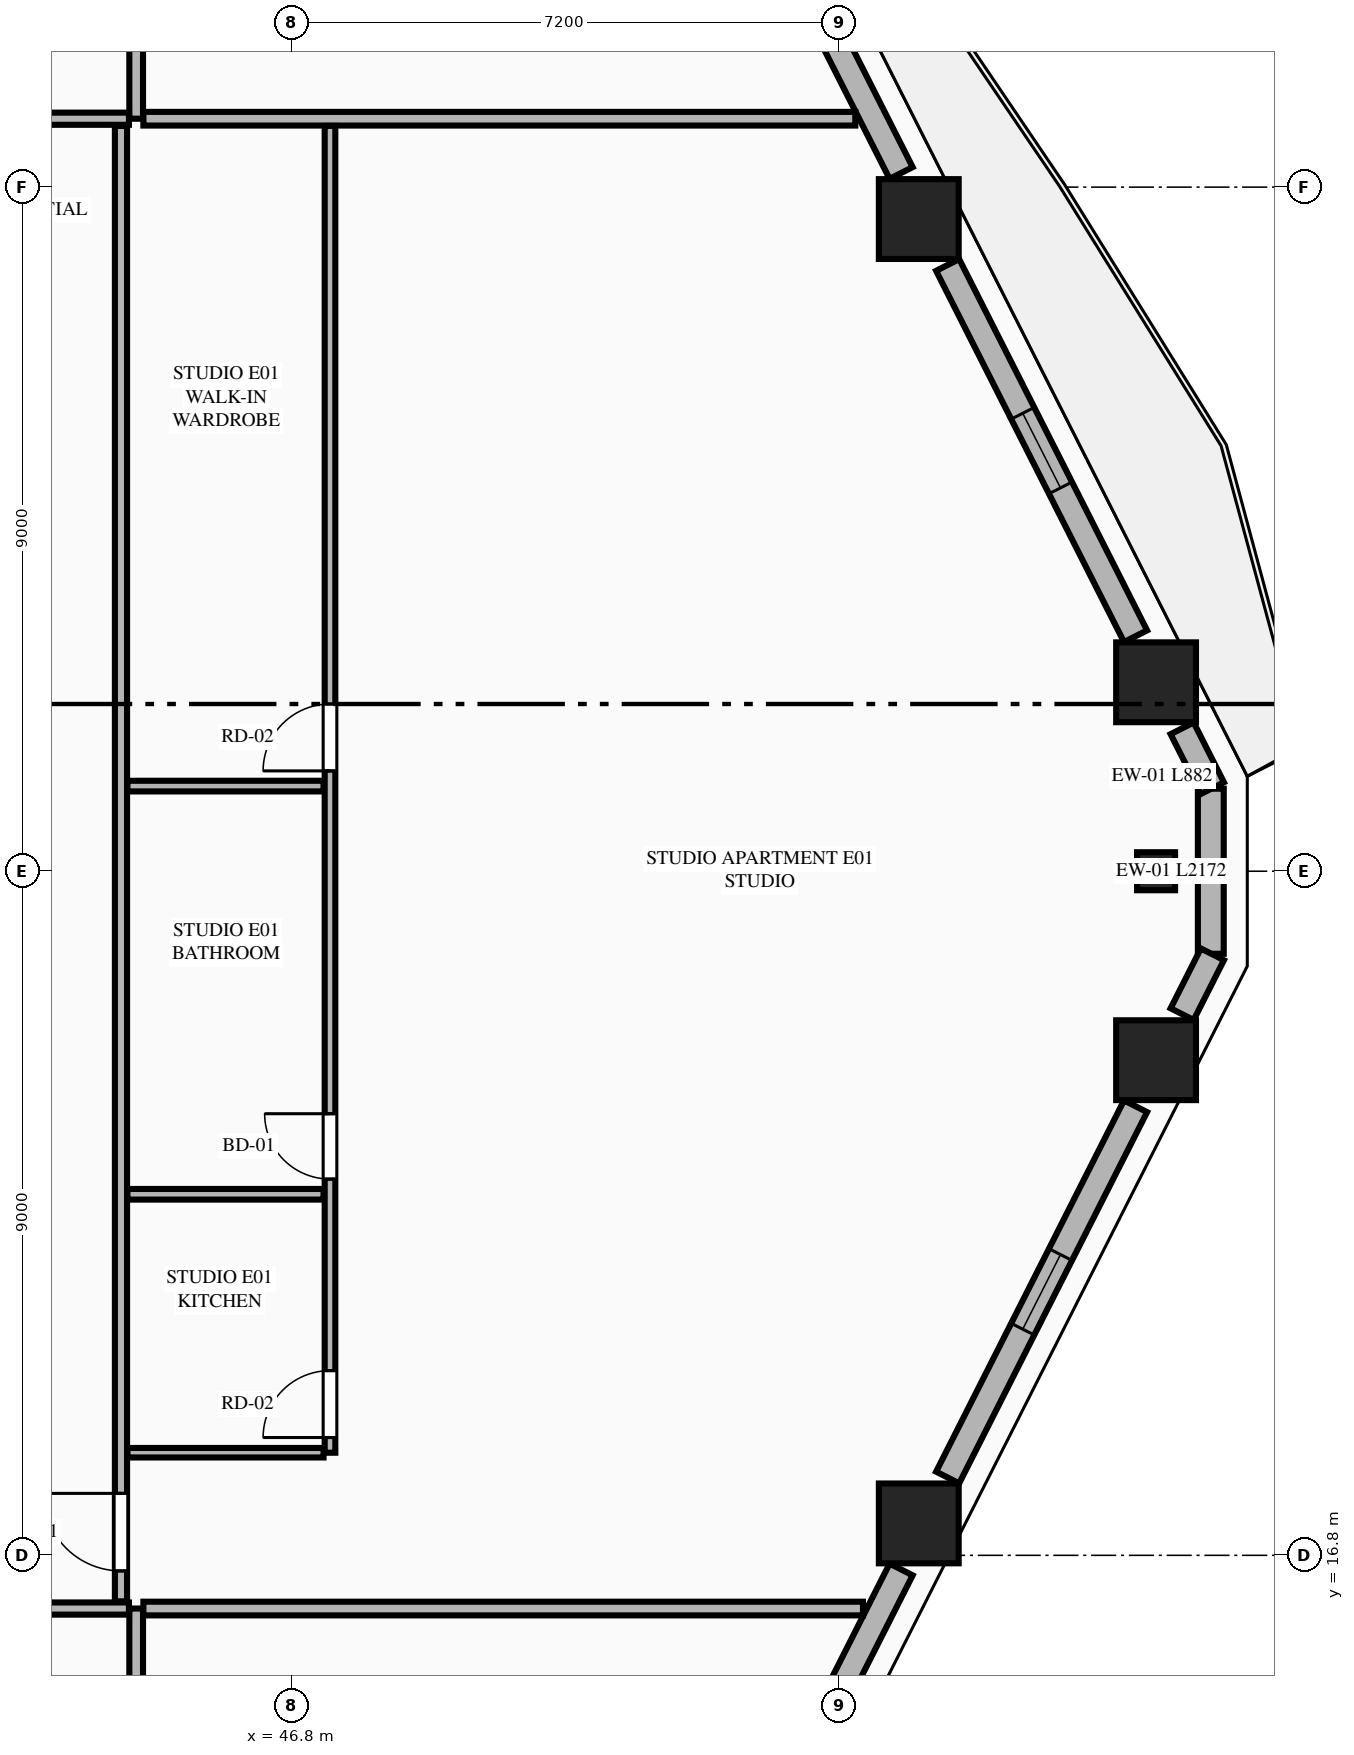
"""IFC4 building model, lengths in metres.
Left out: names, types, materials, properties, quantities, classifications, styles, units other than length and angle.
Written with IfcOpenShell. Run it as: python <this file> out.ifc"""

import sys

from ifc_helpers import new_model, si_unit, direction, frame, frame_2d, origin, origin_2d, place, context, subcontext, project, spatial, rectangle, extrude, element, fill, save


model = new_model("IFC4")
c1 = context("Model", 3, precision=1e-05, world=origin(), true_north=direction((0.0, 1.0)))
c2 = subcontext(c1, "Body", "Model", "MODEL_VIEW")
j1 = project(units=[si_unit("LENGTHUNIT", "METRE"), si_unit("PLANEANGLEUNIT", "RADIAN")], contexts=[c1])
p1 = place(None, origin())
s1 = spatial("IfcSite", under=j1, at=p1, CompositionType="ELEMENT")
p2 = place(p1, origin())
s2 = spatial("IfcBuilding", under=s1, at=p2, CompositionType="ELEMENT")
p3 = place(p2, frame((0.0, 0.0, 90.65)))
s3 = spatial("IfcBuildingStorey", under=s2, at=p3, CompositionType="ELEMENT", Elevation=90.65)
for number, where, z_axis, x_axis in (
    (1, (55.046, 17.22, 0.0), (0.0, 0.0, 1.0), (1.0, 0.0, 0.0)),
    (2, (58.168, 23.314, 0.0), (0.0, 0.0, 1.0), (1.0, 0.0, 0.0)),
    (3, (58.168, 28.286, 0.0), (0.0, 0.0, 1.0), (1.0, 0.0, 0.0)),
    (4, (55.046, 34.38, 0.0), (0.0, 0.0, 1.0), (1.0, 0.0, 0.0)),
):
    element("IfcColumn", number, at=place(p3, frame(where, z_axis=z_axis, x_axis=x_axis)), inside=s3, PredefinedType="COLUMN", context=c2, shape_type="SweptSolid", body=[
        extrude(rectangle(XDim=1.05, YDim=1.05, at=origin_2d()), origin(), (0.0, 0.0, 1.0), 3.55),
    ])
p4 = place(p3, frame((58.168, 25.8, 0.0), z_axis=(0.0, 0.0, 1.0), x_axis=(0.0, 1.0, 0.0)))
e5 = element("IfcColumn", 5, at=p4, inside=s3, PredefinedType="PILASTER", context=c2, shape_type="SweptSolid", body=[
    extrude(rectangle(XDim=0.5, YDim=0.35, at=origin_2d()), origin(), (0.0, 0.0, 1.0), 3.55),
])
p5 = place(p3, frame((58.888, 24.714, 0.0), z_axis=(0.0, 0.0, 1.0), x_axis=(0.0, 1.0, 0.0)))
e6 = element("IfcWall", 6, at=p5, inside=s3, PredefinedType="STANDARD", context=c2, shape_type="SweptSolid", body=[
    extrude(rectangle(XDim=2.172, YDim=0.34, at=frame_2d((1.086, 0.0))), origin(), (0.0, 0.0, 1.0), 3.33),
])
p6 = place(p3, frame((52.233, 11.515, 0.0), z_axis=(0.0, 0.0, 1.0), x_axis=(0.451616680182, 0.892212067942, 0.0)))
e7 = element("IfcWall", 7, at=p6, inside=s3, PredefinedType="STANDARD", context=c2, shape_type="SweptSolid", body=[
    extrude(rectangle(XDim=5.715, YDim=0.34, at=frame_2d((2.857, 0.0))), origin(), (0.0, 0.0, 1.0), 2.712),
])
p7 = place(p6, frame((2.308, 0.0, 0.75)))
e8 = element("IfcOpeningElement", 8, at=p7, cuts=e7, PredefinedType="OPENING", context=c2, shape_type="SweptSolid", body=[
    extrude(rectangle(XDim=1.1, YDim=1.812, at=frame_2d((0.55, 0.906))), frame((0.0, 0.18, 0.0), z_axis=(0.0, -1.0, 0.0), x_axis=(1.0, 0.0, 0.0)), (0.0, 0.0, 1.0), 0.36),
])
p8 = place(p3, frame((55.426, 17.824, 0.0), z_axis=(0.0, 0.0, 1.0), x_axis=(0.451579095309, 0.892231091523, 0.0)))
e9 = element("IfcWall", 9, at=p8, inside=s3, PredefinedType="STANDARD", context=c2, shape_type="SweptSolid", body=[
    extrude(rectangle(XDim=5.474, YDim=0.34, at=frame_2d((2.737, 0.0))), origin(), (0.0, 0.0, 1.0), 2.712),
])
p9 = place(p8, frame((2.187, 0.0, 0.75)))
e10 = element("IfcOpeningElement", 10, at=p9, cuts=e9, PredefinedType="OPENING", context=c2, shape_type="SweptSolid", body=[
    extrude(rectangle(XDim=1.1, YDim=1.812, at=frame_2d((0.55, 0.906))), frame((0.0, 0.18, 0.0), z_axis=(0.0, -1.0, 0.0), x_axis=(1.0, 0.0, 0.0)), (0.0, 0.0, 1.0), 0.36),
])
p10 = place(p3, frame((58.511, 23.92, 0.0), z_axis=(0.0, 0.0, 1.0), x_axis=(0.451195173259, 0.892425299747, 0.0)))
e11 = element("IfcWall", 11, at=p10, inside=s3, PredefinedType="STANDARD", context=c2, shape_type="SweptSolid", body=[
    extrude(rectangle(XDim=0.882, YDim=0.34, at=frame_2d((0.441, 0.0))), origin(), (0.0, 0.0, 1.0), 3.33),
])
p11 = place(p3, frame((58.909, 26.893, 0.0), z_axis=(0.0, 0.0, 1.0), x_axis=(-0.451306655769, 0.892368927327, 0.0)))
e12 = element("IfcWall", 12, at=p11, inside=s3, PredefinedType="STANDARD", context=c2, shape_type="SweptSolid", body=[
    extrude(rectangle(XDim=0.882, YDim=0.34, at=frame_2d((0.441, 0.0))), origin(), (0.0, 0.0, 1.0), 3.33),
])
p12 = place(p3, frame((57.898, 28.892, 0.0), z_axis=(0.0, 0.0, 1.0), x_axis=(-0.451597066012, 0.892221995901, 0.0)))
e13 = element("IfcWall", 13, at=p12, inside=s3, PredefinedType="STANDARD", context=c2, shape_type="SweptSolid", body=[
    extrude(rectangle(XDim=5.474, YDim=0.34, at=frame_2d((2.737, 0.0))), origin(), (0.0, 0.0, 1.0), 2.712),
])
p13 = place(p12, frame((2.187, 0.0, 0.75)))
e14 = element("IfcOpeningElement", 14, at=p13, cuts=e13, PredefinedType="OPENING", context=c2, shape_type="SweptSolid", body=[
    extrude(rectangle(XDim=1.1, YDim=1.812, at=frame_2d((0.55, 0.906))), frame((0.0, 0.18, 0.0), z_axis=(0.0, -1.0, 0.0), x_axis=(1.0, 0.0, 0.0)), (0.0, 0.0, 1.0), 0.36),
])
p14 = place(p3, frame((54.814, 34.986, 0.0), z_axis=(0.0, 0.0, 1.0), x_axis=(-0.451633893529, 0.892203354744, 0.0)))
e15 = element("IfcWall", 15, at=p14, inside=s3, PredefinedType="STANDARD", context=c2, shape_type="SweptSolid", body=[
    extrude(rectangle(XDim=5.715, YDim=0.34, at=frame_2d((2.857, 0.0))), origin(), (0.0, 0.0, 1.0), 2.712),
])
p15 = place(p14, frame((2.833, 0.0, 0.0)))
e16 = element("IfcOpeningElement", 16, at=p15, cuts=e15, PredefinedType="OPENING", context=c2, shape_type="SweptSolid", body=[
    extrude(rectangle(XDim=1.1, YDim=2.25, at=frame_2d((0.55, 1.125))), frame((0.0, 0.18, 0.0), z_axis=(0.0, -1.0, 0.0), x_axis=(1.0, 0.0, 0.0)), (0.0, 0.0, 1.0), 0.36),
])
p16 = place(p3, frame((44.75, 2.455, 0.0), z_axis=(0.0, 0.0, 1.0), x_axis=(0.0, 1.0, 0.0)))
e17 = element("IfcWall", 17, at=p16, inside=s3, PredefinedType="PARTITIONING", context=c2, shape_type="SweptSolid", body=[
    extrude(rectangle(XDim=13.645, YDim=0.18, at=frame_2d((6.823, 0.0))), origin(), (0.0, 0.0, 1.0), 3.33),
])
p17 = place(p3, frame((36.617, 16.1, 0.0), z_axis=(0.0, 0.0, 1.0), x_axis=(1.0, 0.0, 0.0)))
e18 = element("IfcWall", 18, at=p17, inside=s3, PredefinedType="PARTITIONING", context=c2, shape_type="SweptSolid", body=[
    extrude(rectangle(XDim=8.038, YDim=0.16, at=frame_2d((4.019, 0.0))), origin(), (0.0, 0.0, 1.0), 3.33),
])
p18 = place(p17, frame((0.355, 0.0, 0.0)))
e19 = element("IfcOpeningElement", 19, at=p18, cuts=e18, PredefinedType="OPENING", context=c2, shape_type="SweptSolid", body=[
    extrude(rectangle(XDim=1.02, YDim=2.25, at=frame_2d((0.51, 1.125))), frame((0.0, 0.09, 0.0), z_axis=(0.0, -1.0, 0.0), x_axis=(1.0, 0.0, 0.0)), (0.0, 0.0, 1.0), 0.18),
])
p19 = place(p3, frame((44.75, 35.7, 0.0), z_axis=(0.0, 0.0, 1.0), x_axis=(0.0, 1.0, 0.0)))
e20 = element("IfcWall", 20, at=p19, inside=s3, PredefinedType="PARTITIONING", context=c2, shape_type="SweptSolid", body=[
    extrude(rectangle(XDim=13.445, YDim=0.18, at=frame_2d((6.723, 0.0))), origin(), (0.0, 0.0, 1.0), 3.33),
])
p20 = place(p3, frame((20.145, 35.7, 0.0), z_axis=(0.0, 0.0, 1.0), x_axis=(1.0, 0.0, 0.0)))
e21 = element("IfcWall", 21, at=p20, inside=s3, PredefinedType="PARTITIONING", context=c2, shape_type="SweptSolid", body=[
    extrude(rectangle(XDim=24.51, YDim=0.16, at=frame_2d((12.255, 0.0))), origin(), (0.0, 0.0, 1.0), 3.33),
])
p21 = place(p20, frame((0.705, 0.0, 0.0)))
e22 = element("IfcOpeningElement", 22, at=p21, cuts=e21, PredefinedType="OPENING", context=c2, shape_type="SweptSolid", body=[
    extrude(rectangle(XDim=1.02, YDim=2.25, at=frame_2d((0.51, 1.125))), frame((0.0, 0.09, 0.0), z_axis=(0.0, -1.0, 0.0), x_axis=(1.0, 0.0, 0.0)), (0.0, 0.0, 1.0), 0.18),
])
p22 = place(p3, frame((44.845, 16.1, 0.0), z_axis=(0.0, 0.0, 1.0), x_axis=(1.0, 0.0, 0.0)))
e23 = element("IfcWall", 23, at=p22, inside=s3, PredefinedType="PARTITIONING", context=c2, shape_type="SweptSolid", body=[
    extrude(rectangle(XDim=9.467, YDim=0.18, at=frame_2d((4.733, 0.0))), origin(), (0.0, 0.0, 1.0), 3.33),
])
p23 = place(p3, frame((44.845, 35.7, 0.0), z_axis=(0.0, 0.0, 1.0), x_axis=(1.0, 0.0, 0.0)))
e24 = element("IfcWall", 24, at=p23, inside=s3, PredefinedType="PARTITIONING", context=c2, shape_type="SweptSolid", body=[
    extrude(rectangle(XDim=9.366, YDim=0.18, at=frame_2d((4.683, 0.0))), origin(), (0.0, 0.0, 1.0), 3.33),
])
p24 = place(p3, frame((44.55, 16.195, 0.0), z_axis=(0.0, 0.0, 1.0), x_axis=(0.0, 1.0, 0.0)))
e25 = element("IfcWall", 25, at=p24, inside=s3, PredefinedType="PARTITIONING", context=c2, shape_type="SweptSolid", body=[
    extrude(rectangle(XDim=19.41, YDim=0.16, at=frame_2d((9.705, 0.0))), origin(), (0.0, 0.0, 1.0), 2.637),
])
p25 = place(p24, frame((0.4, 0.0, 0.0)))
e26 = element("IfcOpeningElement", 26, at=p25, cuts=e25, PredefinedType="OPENING", context=c2, shape_type="SweptSolid", body=[
    extrude(rectangle(XDim=1.02, YDim=2.25, at=frame_2d((0.51, 1.125))), frame((0.0, 0.09, 0.0), z_axis=(0.0, -1.0, 0.0), x_axis=(1.0, 0.0, 0.0)), (0.0, 0.0, 1.0), 0.18),
])
p26 = place(p3, frame((44.635, 18.15, 0.0), z_axis=(0.0, 0.0, 1.0), x_axis=(1.0, 0.0, 0.0)))
e27 = element("IfcWall", 27, at=p26, inside=s3, PredefinedType="PARTITIONING", context=c2, shape_type="SweptSolid", body=[
    extrude(rectangle(XDim=2.58, YDim=0.125, at=frame_2d((1.29, 0.0))), origin(), (0.0, 0.0, 1.0), 2.637),
])
p27 = place(p3, frame((47.3, 18.15, 0.0), z_axis=(0.0, 0.0, 1.0), x_axis=(0.0, 1.0, 0.0)))
e28 = element("IfcWall", 28, at=p27, inside=s3, PredefinedType="PLUMBINGWALL", context=c2, shape_type="SweptSolid", body=[
    extrude(rectangle(XDim=17.455, YDim=0.14, at=frame_2d((8.728, 0.0))), origin(), (0.0, 0.0, 1.0), 3.33),
])
p28 = place(p27, frame((3.6, 0.0, 0.0)))
e29 = element("IfcOpeningElement", 29, at=p28, cuts=e28, PredefinedType="OPENING", context=c2, shape_type="SweptSolid", body=[
    extrude(rectangle(XDim=0.86, YDim=2.1, at=frame_2d((0.43, 1.05))), frame((0.0, 0.08, 0.0), z_axis=(0.0, -1.0, 0.0), x_axis=(1.0, 0.0, 0.0)), (0.0, 0.0, 1.0), 0.16),
])
p29 = place(p27, frame((8.97, 0.0, 0.0)))
e30 = element("IfcOpeningElement", 30, at=p29, cuts=e28, PredefinedType="OPENING", context=c2, shape_type="SweptSolid", body=[
    extrude(rectangle(XDim=0.88, YDim=2.15, at=frame_2d((0.44, 1.075))), frame((0.0, 0.08, 0.0), z_axis=(0.0, -1.0, 0.0), x_axis=(1.0, 0.0, 0.0)), (0.0, 0.0, 1.0), 0.16),
])
p30 = place(p27, frame((0.2, 0.0, 0.0)))
e31 = element("IfcOpeningElement", 31, at=p30, cuts=e28, PredefinedType="OPENING", context=c2, shape_type="SweptSolid", body=[
    extrude(rectangle(XDim=0.88, YDim=2.15, at=frame_2d((0.44, 1.075))), frame((0.0, 0.08, 0.0), z_axis=(0.0, -1.0, 0.0), x_axis=(1.0, 0.0, 0.0)), (0.0, 0.0, 1.0), 0.16),
])
for number, where, z_axis, x_axis in (
    (32, (44.635, 21.55, 0.0), (0.0, 0.0, 1.0), (1.0, 0.0, 0.0)),
    (33, (44.635, 26.92, 0.0), (0.0, 0.0, 1.0), (1.0, 0.0, 0.0)),
):
    element("IfcWall", number, at=place(p3, frame(where, z_axis=z_axis, x_axis=x_axis)), inside=s3, PredefinedType="PLUMBINGWALL", context=c2, shape_type="SweptSolid", body=[
        extrude(rectangle(XDim=2.58, YDim=0.14, at=frame_2d((1.29, 0.0))), origin(), (0.0, 0.0, 1.0), 3.33),
    ])
p31 = place(p9, origin())
e34 = element("IfcWindow", 34, at=p31, inside=s3, PartitioningType="SINGLE_PANEL", PredefinedType="WINDOW", context=c2, shape_type="SweptSolid", body=[
    extrude(rectangle(XDim=1.1, YDim=1.812, at=frame_2d((0.55, 0.906))), frame((0.0, 0.03, 0.0), z_axis=(0.0, -1.0, 0.0), x_axis=(1.0, 0.0, 0.0)), (0.0, 0.0, 1.0), 0.06),
])
fill(e10, e34)
p32 = place(p13, origin())
e35 = element("IfcWindow", 35, at=p32, inside=s3, PartitioningType="SINGLE_PANEL", PredefinedType="WINDOW", context=c2, shape_type="SweptSolid", body=[
    extrude(rectangle(XDim=1.1, YDim=1.812, at=frame_2d((0.55, 0.906))), frame((0.0, 0.03, 0.0), z_axis=(0.0, -1.0, 0.0), x_axis=(1.0, 0.0, 0.0)), (0.0, 0.0, 1.0), 0.06),
])
fill(e14, e35)
p33 = place(p28, origin())
e36 = element("IfcDoor", 36, at=p33, inside=s3, OperationType="SINGLE_SWING_RIGHT", PredefinedType="DOOR", context=c2, shape_type="SweptSolid", body=[
    extrude(rectangle(XDim=0.86, YDim=2.1, at=frame_2d((0.43, 1.05))), frame((0.0, 0.025, 0.0), z_axis=(0.0, -1.0, 0.0), x_axis=(1.0, 0.0, 0.0)), (0.0, 0.0, 1.0), 0.05),
])
fill(e29, e36)
p34 = place(p29, origin())
e37 = element("IfcDoor", 37, at=p34, inside=s3, OperationType="SINGLE_SWING_LEFT", PredefinedType="DOOR", context=c2, shape_type="SweptSolid", body=[
    extrude(rectangle(XDim=0.88, YDim=2.15, at=frame_2d((0.44, 1.075))), frame((0.0, 0.025, 0.0), z_axis=(0.0, -1.0, 0.0), x_axis=(1.0, 0.0, 0.0)), (0.0, 0.0, 1.0), 0.05),
])
fill(e30, e37)
p35 = place(p25, origin())
e38 = element("IfcDoor", 38, at=p35, inside=s3, OperationType="SINGLE_SWING_RIGHT", PredefinedType="DOOR", context=c2, shape_type="SweptSolid", body=[
    extrude(rectangle(XDim=1.02, YDim=2.25, at=frame_2d((0.51, 1.125))), frame((0.0, 0.025, 0.0), z_axis=(0.0, -1.0, 0.0), x_axis=(1.0, 0.0, 0.0)), (0.0, 0.0, 1.0), 0.05),
])
fill(e26, e38)
p36 = place(p30, origin())
e39 = element("IfcDoor", 39, at=p36, inside=s3, OperationType="SINGLE_SWING_LEFT", PredefinedType="DOOR", context=c2, shape_type="SweptSolid", body=[
    extrude(rectangle(XDim=0.88, YDim=2.15, at=frame_2d((0.44, 1.075))), frame((0.0, 0.025, 0.0), z_axis=(0.0, -1.0, 0.0), x_axis=(1.0, 0.0, 0.0)), (0.0, 0.0, 1.0), 0.05),
])
fill(e31, e39)
save(model, sys.argv[1])
